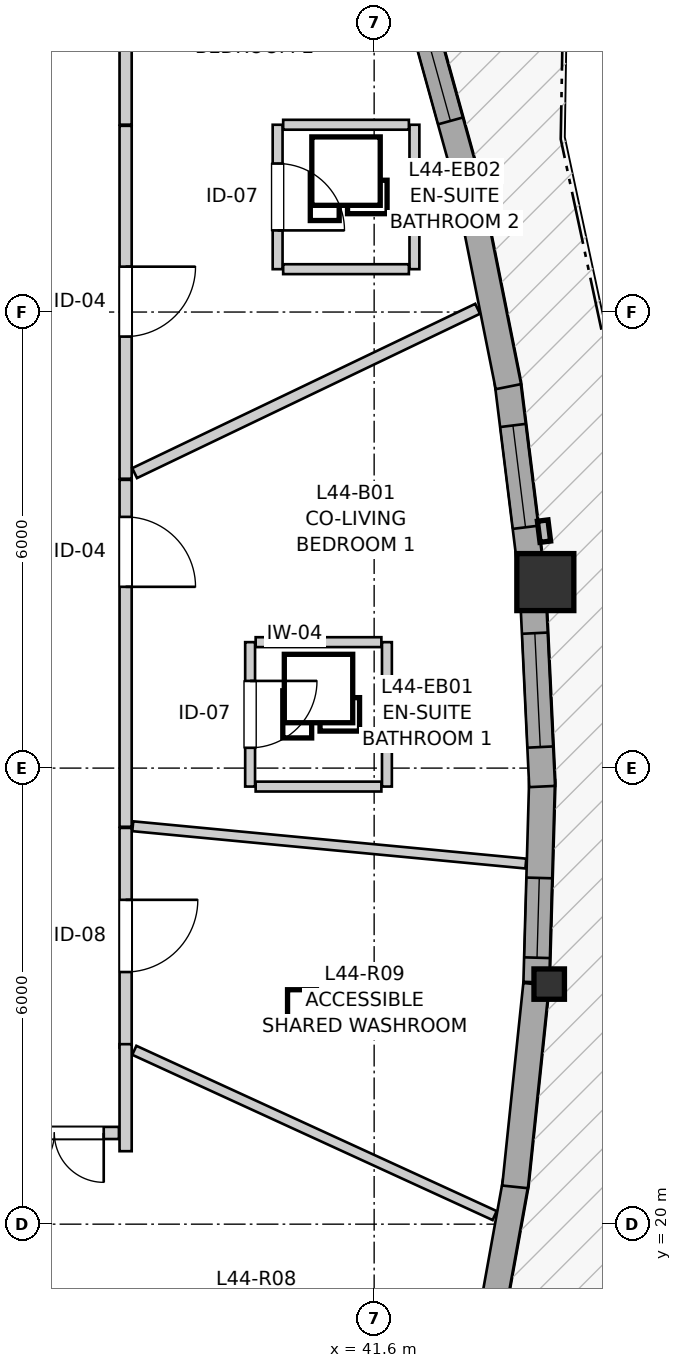
"""IFC4 building model, lengths in metres.
Left out: names, types, materials, properties, quantities, classifications, styles, units other than length and angle.
Written with IfcOpenShell. Run it as: python <this file> out.ifc"""

import sys

from ifc_helpers import new_model, si_unit, direction, frame, frame_2d, origin, origin_2d, place, context, subcontext, project, spatial, rectangle, i_section, extrude, source, transform, mapped, element, fill, save


model = new_model("IFC4")
c1 = context("Model", 3, precision=1e-05, world=origin(), true_north=direction((0.0, 1.0)))
c2 = subcontext(c1, "Body", "Model", "MODEL_VIEW")
j1 = project(units=[si_unit("LENGTHUNIT", "METRE"), si_unit("PLANEANGLEUNIT", "RADIAN")], contexts=[c1])
p1 = place(None, origin())
s1 = spatial("IfcSite", under=j1, at=p1, CompositionType="ELEMENT")
p2 = place(p1, origin())
s2 = spatial("IfcBuilding", under=s1, at=p2, CompositionType="ELEMENT")
p3 = place(p2, frame((0.0, 0.0, 149.0)))
s3 = spatial("IfcBuildingStorey", under=s2, at=p3, CompositionType="ELEMENT", Elevation=149.0)
m1 = source(origin(), c2, "Body", "SweptSolid", [
    extrude(i_section(OverallWidth=0.401, OverallDepth=0.399, WebThickness=0.023, FlangeThickness=0.036, FilletRadius=0.015, at=origin_2d()), origin(), (0.0, 0.0, 1.0), 2.935),
])
p4 = place(p3, frame((43.903, 23.158, 0.0), z_axis=(0.0, 0.0, 1.0), x_axis=(1.0, 0.0, 0.0)))
e1 = element("IfcColumn", 1, at=p4, inside=s3, PredefinedType="PILASTER", context=c2, shape_type="MappedRepresentation", body=[
    mapped(m1, transform((0.0, 0.0, 0.0), x_axis=(1.0, 0.0, 0.0), y_axis=(0.0, 1.0, 0.0), z_axis=(0.0, 0.0, 1.0), scale=1.0)),
])
m2 = source(origin(), c2, "Body", "SweptSolid", [
    extrude(rectangle(XDim=0.75, YDim=0.75, at=origin_2d()), origin(), (0.0, 0.0, 1.0), 2.935),
])
p5 = place(p3, frame((43.852, 28.447, 0.0), z_axis=(0.0, 0.0, 1.0), x_axis=(1.0, 0.0, 0.0)))
e2 = element("IfcColumn", 2, at=p5, inside=s3, PredefinedType="COLUMN", context=c2, shape_type="MappedRepresentation", body=[
    mapped(m2, transform((0.0, 0.0, 0.0), x_axis=(1.0, 0.0, 0.0), y_axis=(0.0, 1.0, 0.0), z_axis=(0.0, 0.0, 1.0), scale=1.0)),
])
p6 = place(p3, frame((42.997, 33.729, 0.0), z_axis=(0.0, 0.0, 1.0), x_axis=(1.0, 0.0, 0.0)))
e3 = element("IfcColumn", 3, at=p6, inside=s3, PredefinedType="PILASTER", context=c2, shape_type="MappedRepresentation", body=[
    mapped(m1, transform((0.0, 0.0, 0.0), x_axis=(1.0, 0.0, 0.0), y_axis=(0.0, 1.0, 0.0), z_axis=(0.0, 0.0, 1.0), scale=1.0)),
])
p7 = place(p3, frame((43.01, 18.044, 0.0), z_axis=(0.0, 0.0, 1.0), x_axis=(0.177116262048, 0.984189935794, 0.0)))
e4 = element("IfcWall", 4, at=p7, inside=s3, PredefinedType="SOLIDWALL", context=c2, shape_type="SweptSolid", body=[
    extrude(rectangle(XDim=2.575, YDim=0.34, at=frame_2d((1.288, 0.0))), origin(), (0.0, 0.0, 1.0), 2.515),
])
p8 = place(p3, frame((43.454, 20.49, 0.0), z_axis=(0.0, 0.0, 1.0), x_axis=(0.103669919384, 0.994611757328, 0.0)))
e5 = element("IfcWall", 5, at=p8, inside=s3, PredefinedType="SOLIDWALL", context=c2, shape_type="SweptSolid", body=[
    extrude(rectangle(XDim=2.68, YDim=0.34, at=frame_2d((1.34, 0.0))), origin(), (0.0, 0.0, 1.0), 2.515),
])
p9 = place(p3, frame((43.734, 23.183, 0.0), z_axis=(0.0, 0.0, 1.0), x_axis=(0.028311286797, 0.999599155182, 0.0)))
e6 = element("IfcWall", 6, at=p9, inside=s3, PredefinedType="SOLIDWALL", context=c2, shape_type="SweptSolid", body=[
    extrude(rectangle(XDim=2.665, YDim=0.34, at=frame_2d((1.332, 0.0))), origin(), (0.0, 0.0, 1.0), 2.515),
])
p10 = place(p9, frame((0.323, 0.0, 0.82)))
e7 = element("IfcOpeningElement", 7, at=p10, cuts=e6, PredefinedType="OPENING", context=c2, shape_type="SweptSolid", body=[
    extrude(rectangle(XDim=1.05, YDim=1.45, at=frame_2d((0.525, 0.725))), frame((0.0, 0.18, 0.0), z_axis=(0.0, -1.0, 0.0), x_axis=(1.0, 0.0, 0.0)), (0.0, 0.0, 1.0), 0.36),
])
p11 = place(p3, frame((43.81, 25.758, 0.0), z_axis=(0.0, 0.0, 1.0), x_axis=(-0.047679791281, 0.998862671994, 0.0)))
e8 = element("IfcWall", 8, at=p11, inside=s3, PredefinedType="SOLIDWALL", context=c2, shape_type="SweptSolid", body=[
    extrude(rectangle(XDim=2.53, YDim=0.34, at=frame_2d((1.265, 0.0))), origin(), (0.0, 0.0, 1.0), 2.515),
])
p12 = place(p11, frame((0.52, 0.0, 0.82)))
e9 = element("IfcOpeningElement", 9, at=p12, cuts=e8, PredefinedType="OPENING", context=c2, shape_type="SweptSolid", body=[
    extrude(rectangle(XDim=1.5, YDim=1.45, at=frame_2d((0.75, 0.725))), frame((0.0, 0.18, 0.0), z_axis=(0.0, -1.0, 0.0), x_axis=(1.0, 0.0, 0.0)), (0.0, 0.0, 1.0), 0.36),
])
p13 = place(p3, frame((43.664, 28.58, 0.0), z_axis=(0.0, 0.0, 1.0), x_axis=(-0.122794881762, 0.992432071737, 0.0)))
e10 = element("IfcWall", 10, at=p13, inside=s3, PredefinedType="SOLIDWALL", context=c2, shape_type="SweptSolid", body=[
    extrude(rectangle(XDim=2.545, YDim=0.34, at=frame_2d((1.272, 0.0))), origin(), (0.0, 0.0, 1.0), 2.515),
])
p14 = place(p13, frame((0.592, 0.0, 0.82)))
e11 = element("IfcOpeningElement", 11, at=p14, cuts=e10, PredefinedType="OPENING", context=c2, shape_type="SweptSolid", body=[
    extrude(rectangle(XDim=1.35, YDim=1.45, at=frame_2d((0.675, 0.725))), frame((0.0, 0.18, 0.0), z_axis=(0.0, -1.0, 0.0), x_axis=(1.0, 0.0, 0.0)), (0.0, 0.0, 1.0), 0.36),
])
p15 = place(p3, frame((43.366, 31.018, 0.0), z_axis=(0.0, 0.0, 1.0), x_axis=(-0.196116135138, 0.980580675691, 0.0)))
e12 = element("IfcWall", 12, at=p15, inside=s3, PredefinedType="SOLIDWALL", context=c2, shape_type="SweptSolid", body=[
    extrude(rectangle(XDim=2.71, YDim=0.34, at=frame_2d((1.355, 0.0))), origin(), (0.0, 0.0, 1.0), 2.515),
])
p16 = place(p3, frame((42.828, 33.703, 0.0), z_axis=(0.0, 0.0, 1.0), x_axis=(-0.266340796898, 0.963878923884, 0.0)))
e13 = element("IfcWall", 13, at=p16, inside=s3, PredefinedType="SOLIDWALL", context=c2, shape_type="SweptSolid", body=[
    extrude(rectangle(XDim=2.755, YDim=0.34, at=frame_2d((1.377, 0.0))), origin(), (0.0, 0.0, 1.0), 2.515),
])
p17 = place(p16, frame((0.842, 0.0, 0.82)))
e14 = element("IfcOpeningElement", 14, at=p17, cuts=e13, PredefinedType="OPENING", context=c2, shape_type="SweptSolid", body=[
    extrude(rectangle(XDim=1.05, YDim=1.45, at=frame_2d((0.525, 0.725))), frame((0.0, 0.18, 0.0), z_axis=(0.0, -1.0, 0.0), x_axis=(1.0, 0.0, 0.0)), (0.0, 0.0, 1.0), 0.36),
])
p18 = place(p3, frame((38.33, 34.45, 0.0), z_axis=(0.0, 0.0, 1.0), x_axis=(0.0, -1.0, 0.0)))
e15 = element("IfcWall", 15, at=p18, inside=s3, PredefinedType="PARTITIONING", context=c2, shape_type="SweptSolid", body=[
    extrude(rectangle(XDim=4.643, YDim=0.16, at=frame_2d((2.322, 0.0))), origin(), (0.0, 0.0, 1.0), 2.573),
])
p19 = place(p18, frame((1.853, 0.0, 0.0)))
e16 = element("IfcOpeningElement", 16, at=p19, cuts=e15, PredefinedType="OPENING", context=c2, shape_type="SweptSolid", body=[
    extrude(rectangle(XDim=0.92, YDim=2.1, at=frame_2d((0.46, 1.05))), frame((0.0, 0.09, 0.0), z_axis=(0.0, -1.0, 0.0), x_axis=(1.0, 0.0, 0.0)), (0.0, 0.0, 1.0), 0.18),
])
p20 = place(p3, frame((38.33, 29.792, 0.0), z_axis=(0.0, 0.0, 1.0), x_axis=(0.0, -1.0, 0.0)))
e17 = element("IfcWall", 17, at=p20, inside=s3, PredefinedType="PARTITIONING", context=c2, shape_type="SweptSolid", body=[
    extrude(rectangle(XDim=4.564, YDim=0.16, at=frame_2d((2.282, 0.0))), origin(), (0.0, 0.0, 1.0), 2.935),
])
p21 = place(p20, frame((0.487, 0.0, 0.0)))
e18 = element("IfcOpeningElement", 18, at=p21, cuts=e17, PredefinedType="OPENING", context=c2, shape_type="SweptSolid", body=[
    extrude(rectangle(XDim=0.92, YDim=2.1, at=frame_2d((0.46, 1.05))), frame((0.0, 0.09, 0.0), z_axis=(0.0, -1.0, 0.0), x_axis=(1.0, 0.0, 0.0)), (0.0, 0.0, 1.0), 0.18),
])
p22 = place(p3, frame((38.33, 25.213, 0.0), z_axis=(0.0, 0.0, 1.0), x_axis=(0.0, -1.0, 0.0)))
e19 = element("IfcWall", 19, at=p22, inside=s3, PredefinedType="PARTITIONING", context=c2, shape_type="SweptSolid", body=[
    extrude(rectangle(XDim=2.89, YDim=0.16, at=frame_2d((1.445, 0.0))), origin(), (0.0, 0.0, 1.0), 2.935),
])
p23 = place(p22, frame((0.946, 0.0, 0.0)))
e20 = element("IfcOpeningElement", 20, at=p23, cuts=e19, PredefinedType="OPENING", context=c2, shape_type="SweptSolid", body=[
    extrude(rectangle(XDim=0.95, YDim=2.1, at=frame_2d((0.475, 1.05))), frame((0.0, 0.09, 0.0), z_axis=(0.0, -1.0, 0.0), x_axis=(1.0, 0.0, 0.0)), (0.0, 0.0, 1.0), 0.18),
])
p24 = place(p3, frame((39.968, 27.657, 0.0), z_axis=(0.0, 0.0, 1.0), x_axis=(0.0, -1.0, 0.0)))
e21 = element("IfcWall", 21, at=p24, inside=s3, PredefinedType="PARTITIONING", context=c2, shape_type="SweptSolid", body=[
    extrude(rectangle(XDim=1.9, YDim=0.13, at=frame_2d((0.95, 0.0))), origin(), (0.0, 0.0, 1.0), 2.935),
])
p25 = place(p24, frame((0.51, 0.0, 0.0)))
e22 = element("IfcOpeningElement", 22, at=p25, cuts=e21, PredefinedType="OPENING", context=c2, shape_type="SweptSolid", body=[
    extrude(rectangle(XDim=0.88, YDim=2.05, at=frame_2d((0.44, 1.025))), frame((0.0, 0.075, 0.0), z_axis=(0.0, -1.0, 0.0), x_axis=(1.0, 0.0, 0.0)), (0.0, 0.0, 1.0), 0.15),
])
p26 = place(p3, frame((40.33, 34.464, 0.0), z_axis=(0.0, 0.0, 1.0), x_axis=(0.0, -1.0, 0.0)))
e23 = element("IfcWall", 23, at=p26, inside=s3, PredefinedType="PARTITIONING", context=c2, shape_type="SweptSolid", body=[
    extrude(rectangle(XDim=1.9, YDim=0.13, at=frame_2d((0.95, 0.0))), origin(), (0.0, 0.0, 1.0), 2.543),
])
p27 = place(p26, frame((0.51, 0.0, 0.0)))
e24 = element("IfcOpeningElement", 24, at=p27, cuts=e23, PredefinedType="OPENING", context=c2, shape_type="SweptSolid", body=[
    extrude(rectangle(XDim=0.88, YDim=2.05, at=frame_2d((0.44, 1.025))), frame((0.0, 0.075, 0.0), z_axis=(0.0, -1.0, 0.0), x_axis=(1.0, 0.0, 0.0)), (0.0, 0.0, 1.0), 0.15),
])
p28 = place(p3, frame((38.242, 21.2, 0.0), z_axis=(0.0, 0.0, 1.0), x_axis=(-1.0, 0.0, 0.0)))
e25 = element("IfcWall", 25, at=p28, inside=s3, PredefinedType="PARTITIONING", context=c2, shape_type="SweptSolid", body=[
    extrude(rectangle(XDim=1.684, YDim=0.16, at=frame_2d((0.842, 0.0))), origin(), (0.0, 0.0, 1.0), 2.935),
])
p29 = place(p28, frame((0.2, 0.0, 0.0)))
e26 = element("IfcOpeningElement", 26, at=p29, cuts=e25, PredefinedType="OPENING", context=c2, shape_type="SweptSolid", body=[
    extrude(rectangle(XDim=1.3, YDim=2.1, at=frame_2d((0.65, 1.05))), frame((0.0, 0.09, 0.0), z_axis=(0.0, -1.0, 0.0), x_axis=(1.0, 0.0, 0.0)), (0.0, 0.0, 1.0), 0.18),
])
p30 = place(p3, frame((36.609, 19.221, 0.0), z_axis=(0.0, 0.0, 1.0), x_axis=(0.67832941292, -0.734757924467, 0.0)))
e27 = element("IfcWall", 27, at=p30, inside=s3, PredefinedType="PARTITIONING", context=c2, shape_type="SweptSolid", body=[
    extrude(rectangle(XDim=7.403, YDim=0.145, at=frame_2d((3.701, 0.0))), origin(), (0.0, 0.0, 1.0), 2.935),
])
p31 = place(p3, frame((38.444, 22.288, 0.0), z_axis=(0.0, 0.0, 1.0), x_axis=(0.908945866603, -0.416914153736, 0.0)))
e28 = element("IfcWall", 28, at=p31, inside=s3, PredefinedType="PARTITIONING", context=c2, shape_type="SweptSolid", body=[
    extrude(rectangle(XDim=5.217, YDim=0.13, at=frame_2d((2.608, 0.0))), origin(), (0.0, 0.0, 1.0), 2.103),
])
p32 = place(p3, frame((38.424, 25.235, 0.0), z_axis=(0.0, 0.0, 1.0), x_axis=(0.995523942217, -0.094509684549, 0.0)))
e29 = element("IfcWall", 29, at=p32, inside=s3, PredefinedType="PARTITIONING", context=c2, shape_type="SweptSolid", body=[
    extrude(rectangle(XDim=5.195, YDim=0.13, at=frame_2d((2.597, 0.0))), origin(), (0.0, 0.0, 1.0), 2.935),
])
p33 = place(p3, frame((38.448, 29.881, 0.0), z_axis=(0.0, 0.0, 1.0), x_axis=(0.901842564972, 0.432064796072, 0.0)))
e30 = element("IfcWall", 30, at=p33, inside=s3, PredefinedType="PARTITIONING", context=c2, shape_type="SweptSolid", body=[
    extrude(rectangle(XDim=5.004, YDim=0.145, at=frame_2d((2.502, 0.0))), origin(), (0.0, 0.0, 1.0), 2.103),
])
p34 = place(p3, frame((41.768, 25.757, 0.0), z_axis=(0.0, 0.0, 1.0), x_axis=(0.0, 1.0, 0.0)))
e31 = element("IfcWall", 31, at=p34, inside=s3, PredefinedType="PARTITIONING", context=c2, shape_type="SweptSolid", body=[
    extrude(rectangle(XDim=1.9, YDim=0.13, at=frame_2d((0.95, 0.0))), origin(), (0.0, 0.0, 1.0), 2.935),
])
p35 = place(p3, frame((42.13, 32.564, 0.0), z_axis=(0.0, 0.0, 1.0), x_axis=(0.0, 1.0, 0.0)))
e32 = element("IfcWall", 32, at=p35, inside=s3, PredefinedType="PARTITIONING", context=c2, shape_type="SweptSolid", body=[
    extrude(rectangle(XDim=1.9, YDim=0.13, at=frame_2d((0.95, 0.0))), origin(), (0.0, 0.0, 1.0), 2.935),
])
for number, where, z_axis, x_axis in (
    (33, (40.403, 34.464, 0.0), (0.0, 0.0, 1.0), (1.0, 0.0, 0.0)),
    (34, (40.403, 32.564, 0.0), (0.0, 0.0, 1.0), (1.0, 0.0, 0.0)),
):
    element("IfcWall", number, at=place(p3, frame(where, z_axis=z_axis, x_axis=x_axis)), inside=s3, PredefinedType="PARTITIONING", context=c2, shape_type="SweptSolid", body=[
        extrude(rectangle(XDim=1.654, YDim=0.13, at=frame_2d((0.827, 0.0))), origin(), (0.0, 0.0, 1.0), 2.935),
    ])
p36 = place(p3, frame((40.041, 27.657, 0.0), z_axis=(0.0, 0.0, 1.0), x_axis=(1.0, 0.0, 0.0)))
e35 = element("IfcWall", 35, at=p36, inside=s3, PredefinedType="PARTITIONING", context=c2, shape_type="SweptSolid", body=[
    extrude(rectangle(XDim=1.654, YDim=0.13, at=frame_2d((0.827, 0.0))), origin(), (0.0, 0.0, 1.0), 2.103),
])
p37 = place(p3, frame((40.041, 25.757, 0.0), z_axis=(0.0, 0.0, 1.0), x_axis=(1.0, 0.0, 0.0)))
e36 = element("IfcWall", 36, at=p37, inside=s3, PredefinedType="PARTITIONING", context=c2, shape_type="SweptSolid", body=[
    extrude(rectangle(XDim=1.654, YDim=0.13, at=frame_2d((0.827, 0.0))), origin(), (0.0, 0.0, 1.0), 2.935),
])
p38 = place(p3, frame((38.33, 34.465, 0.0), z_axis=(0.0, 0.0, 1.0), x_axis=(0.0, 1.0, 0.0)))
e37 = element("IfcWall", 37, at=p38, inside=s3, PredefinedType="PARTITIONING", context=c2, shape_type="SweptSolid", body=[
    extrude(rectangle(XDim=1.765, YDim=0.16, at=frame_2d((0.882, 0.0))), origin(), (0.0, 0.0, 1.0), 2.573),
])
p39 = place(p3, frame((38.33, 20.96, 0.0), z_axis=(0.0, 0.0, 1.0), x_axis=(0.0, 1.0, 0.0)))
e38 = element("IfcWall", 38, at=p39, inside=s3, PredefinedType="PARTITIONING", context=c2, shape_type="SweptSolid", body=[
    extrude(rectangle(XDim=1.408, YDim=0.16, at=frame_2d((0.704, 0.0))), origin(), (0.0, 0.0, 1.0), 2.935),
])
m3 = source(origin(), c2, "Body", "SweptSolid", [
    extrude(rectangle(XDim=1.05, YDim=1.45, at=frame_2d((0.525, 0.725))), frame((0.0, 0.03, 0.0), z_axis=(0.0, -1.0, 0.0), x_axis=(1.0, 0.0, 0.0)), (0.0, 0.0, 1.0), 0.06),
])
p40 = place(p10, origin())
e39 = element("IfcWindow", 39, at=p40, inside=s3, PartitioningType="SINGLE_PANEL", PredefinedType="WINDOW", context=c2, shape_type="MappedRepresentation", body=[
    mapped(m3, transform((0.0, 0.0, 0.0), x_axis=(1.0, 0.0, 0.0), y_axis=(0.0, 1.0, 0.0), z_axis=(0.0, 0.0, 1.0), scale=1.0)),
])
fill(e7, e39)
m4 = source(origin(), c2, "Body", "SweptSolid", [
    extrude(rectangle(XDim=1.5, YDim=1.45, at=frame_2d((0.75, 0.725))), frame((0.0, 0.03, 0.0), z_axis=(0.0, -1.0, 0.0), x_axis=(1.0, 0.0, 0.0)), (0.0, 0.0, 1.0), 0.06),
])
p41 = place(p12, origin())
e40 = element("IfcWindow", 40, at=p41, inside=s3, PartitioningType="SINGLE_PANEL", PredefinedType="WINDOW", context=c2, shape_type="MappedRepresentation", body=[
    mapped(m4, transform((0.0, 0.0, 0.0), x_axis=(1.0, 0.0, 0.0), y_axis=(0.0, 1.0, 0.0), z_axis=(0.0, 0.0, 1.0), scale=1.0)),
])
fill(e9, e40)
m5 = source(origin(), c2, "Body", "SweptSolid", [
    extrude(rectangle(XDim=1.35, YDim=1.45, at=frame_2d((0.675, 0.725))), frame((0.0, 0.03, 0.0), z_axis=(0.0, -1.0, 0.0), x_axis=(1.0, 0.0, 0.0)), (0.0, 0.0, 1.0), 0.06),
])
p42 = place(p14, origin())
e41 = element("IfcWindow", 41, at=p42, inside=s3, PartitioningType="SINGLE_PANEL", PredefinedType="WINDOW", context=c2, shape_type="MappedRepresentation", body=[
    mapped(m5, transform((0.0, 0.0, 0.0), x_axis=(1.0, 0.0, 0.0), y_axis=(0.0, 1.0, 0.0), z_axis=(0.0, 0.0, 1.0), scale=1.0)),
])
fill(e11, e41)
p43 = place(p17, origin())
e42 = element("IfcWindow", 42, at=p43, inside=s3, PartitioningType="SINGLE_PANEL", PredefinedType="WINDOW", context=c2, shape_type="MappedRepresentation", body=[
    mapped(m3, transform((0.0, 0.0, 0.0), x_axis=(1.0, 0.0, 0.0), y_axis=(0.0, 1.0, 0.0), z_axis=(0.0, 0.0, 1.0), scale=1.0)),
])
fill(e14, e42)
m6 = source(origin(), c2, "Body", "SweptSolid", [
    extrude(rectangle(XDim=0.92, YDim=2.1, at=frame_2d((0.46, 1.05))), frame((0.0, 0.025, 0.0), z_axis=(0.0, -1.0, 0.0), x_axis=(1.0, 0.0, 0.0)), (0.0, 0.0, 1.0), 0.05),
])
p44 = place(p19, origin())
e43 = element("IfcDoor", 43, at=p44, inside=s3, OperationType="SINGLE_SWING_LEFT", PredefinedType="DOOR", context=c2, shape_type="MappedRepresentation", body=[
    mapped(m6, transform((0.0, 0.0, 0.0), x_axis=(1.0, 0.0, 0.0), y_axis=(0.0, 1.0, 0.0), z_axis=(0.0, 0.0, 1.0), scale=1.0)),
])
fill(e16, e43)
p45 = place(p21, origin())
e44 = element("IfcDoor", 44, at=p45, inside=s3, OperationType="SINGLE_SWING_RIGHT", PredefinedType="DOOR", context=c2, shape_type="MappedRepresentation", body=[
    mapped(m6, transform((0.0, 0.0, 0.0), x_axis=(1.0, 0.0, 0.0), y_axis=(0.0, 1.0, 0.0), z_axis=(0.0, 0.0, 1.0), scale=1.0)),
])
fill(e18, e44)
m7 = source(origin(), c2, "Body", "SweptSolid", [
    extrude(rectangle(XDim=0.95, YDim=2.1, at=frame_2d((0.475, 1.05))), frame((0.0, 0.025, 0.0), z_axis=(0.0, -1.0, 0.0), x_axis=(1.0, 0.0, 0.0)), (0.0, 0.0, 1.0), 0.05),
])
p46 = place(p23, origin())
e45 = element("IfcDoor", 45, at=p46, inside=s3, OperationType="SINGLE_SWING_LEFT", PredefinedType="DOOR", context=c2, shape_type="MappedRepresentation", body=[
    mapped(m7, transform((0.0, 0.0, 0.0), x_axis=(1.0, 0.0, 0.0), y_axis=(0.0, 1.0, 0.0), z_axis=(0.0, 0.0, 1.0), scale=1.0)),
])
fill(e20, e45)
m8 = source(origin(), c2, "Body", "SweptSolid", [
    extrude(rectangle(XDim=0.88, YDim=2.05, at=frame_2d((0.44, 1.025))), frame((0.0, 0.025, 0.0), z_axis=(0.0, -1.0, 0.0), x_axis=(1.0, 0.0, 0.0)), (0.0, 0.0, 1.0), 0.05),
])
p47 = place(p25, origin())
e46 = element("IfcDoor", 46, at=p47, inside=s3, OperationType="SINGLE_SWING_LEFT", PredefinedType="DOOR", context=c2, shape_type="MappedRepresentation", body=[
    mapped(m8, transform((0.0, 0.0, 0.0), x_axis=(1.0, 0.0, 0.0), y_axis=(0.0, 1.0, 0.0), z_axis=(0.0, 0.0, 1.0), scale=1.0)),
])
fill(e22, e46)
p48 = place(p27, origin())
e47 = element("IfcDoor", 47, at=p48, inside=s3, OperationType="SINGLE_SWING_RIGHT", PredefinedType="DOOR", context=c2, shape_type="MappedRepresentation", body=[
    mapped(m8, transform((0.0, 0.0, 0.0), x_axis=(1.0, 0.0, 0.0), y_axis=(0.0, 1.0, 0.0), z_axis=(0.0, 0.0, 1.0), scale=1.0)),
])
fill(e24, e47)
m9 = source(origin(), c2, "Body", "SweptSolid", [
    extrude(rectangle(XDim=1.3, YDim=2.1, at=frame_2d((0.65, 1.05))), frame((0.0, 0.025, 0.0), z_axis=(0.0, -1.0, 0.0), x_axis=(1.0, 0.0, 0.0)), (0.0, 0.0, 1.0), 0.05),
])
p49 = place(p29, origin())
e48 = element("IfcDoor", 48, at=p49, inside=s3, OperationType="DOUBLE_DOOR_SINGLE_SWING", PredefinedType="DOOR", context=c2, shape_type="MappedRepresentation", body=[
    mapped(m9, transform((0.0, 0.0, 0.0), x_axis=(1.0, 0.0, 0.0), y_axis=(0.0, 1.0, 0.0), z_axis=(0.0, 0.0, 1.0), scale=1.0)),
])
fill(e26, e48)
save(model, sys.argv[1])
